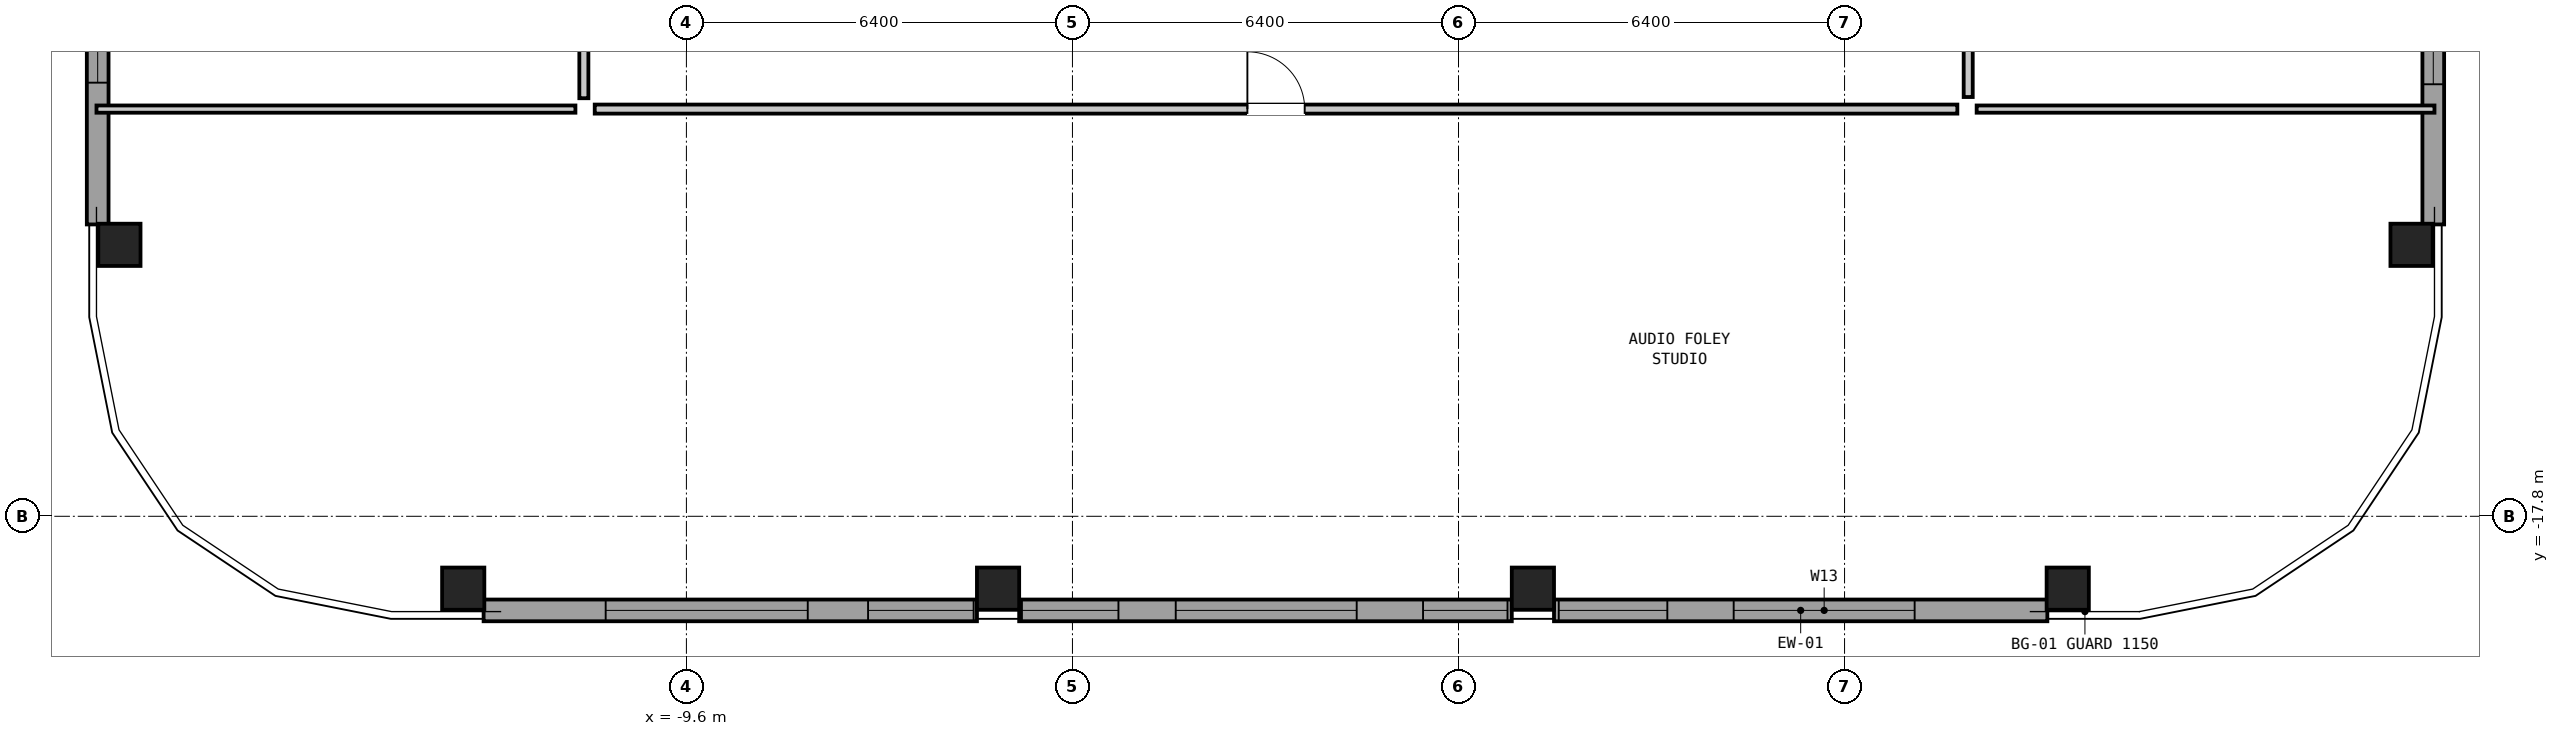
"""IFC4 building model, lengths in metres.
Left out: names, types, materials, properties, quantities, classifications, styles, units other than length and angle.
Written with IfcOpenShell. Run it as: python <this file> out.ifc"""

import sys

from ifc_helpers import new_model, si_unit, direction, frame, frame_2d, origin, origin_2d, place, context, subcontext, project, spatial, rectangle, hollow_rectangle, extrude, element, fill, save


model = new_model("IFC4")
c1 = context("Model", 3, precision=1e-05, world=origin(), true_north=direction((0.0, 1.0)))
c2 = subcontext(c1, "Body", "Model", "MODEL_VIEW")
j1 = project(units=[si_unit("LENGTHUNIT", "METRE"), si_unit("PLANEANGLEUNIT", "RADIAN")], contexts=[c1])
p1 = place(None, origin())
s1 = spatial("IfcSite", under=j1, at=p1, CompositionType="ELEMENT")
p2 = place(p1, origin())
s2 = spatial("IfcBuilding", under=s1, at=p2, CompositionType="ELEMENT")
p3 = place(p2, frame((0.0, 0.0, 202.55)))
s3 = spatial("IfcBuildingStorey", under=s2, at=p3, CompositionType="ELEMENT", Elevation=202.55)
for number, where, z_axis, x_axis in (
    (1, (-13.3, -19.0, 0.0), (0.0, 0.0, 1.0), (1.0, 0.0, 0.0)),
    (2, (-4.433, -19.0, 0.0), (0.0, 0.0, 1.0), (1.0, 0.0, 0.0)),
    (3, (4.433, -19.0, 0.0), (0.0, 0.0, 1.0), (1.0, 0.0, 0.0)),
    (4, (13.3, -19.0, 0.0), (0.0, 0.0, 1.0), (1.0, 0.0, 0.0)),
    (5, (19.0, -13.3, 0.0), (0.0, 0.0, 1.0), (0.0, 1.0, 0.0)),
    (6, (-19.0, -13.3, 0.0), (0.0, 0.0, 1.0), (0.0, 1.0, 0.0)),
):
    element("IfcColumn", number, at=place(p3, frame(where, z_axis=z_axis, x_axis=x_axis)), inside=s3, PredefinedType="COLUMN", context=c2, shape_type="SweptSolid", body=[
        extrude(hollow_rectangle(XDim=0.7, YDim=0.7, WallThickness=0.045, at=origin_2d()), origin(), (0.0, 0.0, 1.0), 3.05),
    ])
p4 = place(p3, frame((12.962, -19.36, 0.0), z_axis=(0.0, 0.0, 1.0), x_axis=(-1.0, 0.0, 0.0)))
e7 = element("IfcWall", 7, at=p4, inside=s3, PredefinedType="SOLIDWALL", context=c2, shape_type="SweptSolid", body=[
    extrude(rectangle(XDim=8.179, YDim=0.36, at=frame_2d((4.089, 0.0))), origin(), (0.0, 0.0, 1.0), 2.374),
])
p5 = place(p4, frame((2.2, 0.0, 0.2)))
e8 = element("IfcOpeningElement", 8, at=p5, cuts=e7, PredefinedType="OPENING", context=c2, shape_type="SweptSolid", body=[
    extrude(rectangle(XDim=3.0, YDim=1.0, at=frame_2d((1.5, 0.5))), frame((0.0, 0.192, 0.0), z_axis=(0.0, -1.0, 0.0), x_axis=(1.0, 0.0, 0.0)), (0.0, 0.0, 1.0), 0.384),
])
p6 = place(p4, frame((6.3, 0.0, 1.25)))
e9 = element("IfcOpeningElement", 9, at=p6, cuts=e7, PredefinedType="OPENING", context=c2, shape_type="SweptSolid", body=[
    extrude(rectangle(XDim=1.8, YDim=0.95, at=frame_2d((0.9, 0.475))), frame((0.0, 0.192, 0.0), z_axis=(0.0, -1.0, 0.0), x_axis=(1.0, 0.0, 0.0)), (0.0, 0.0, 1.0), 0.384),
])
p7 = place(p3, frame((4.083, -19.36, 0.0), z_axis=(0.0, 0.0, 1.0), x_axis=(-1.0, 0.0, 0.0)))
e10 = element("IfcWall", 10, at=p7, inside=s3, PredefinedType="SOLIDWALL", context=c2, shape_type="SweptSolid", body=[
    extrude(rectangle(XDim=8.167, YDim=0.36, at=frame_2d((4.083, 0.0))), origin(), (0.0, 0.0, 1.0), 2.374),
])
p8 = place(p7, frame((0.071, 0.0, 1.25)))
e11 = element("IfcOpeningElement", 11, at=p8, cuts=e10, PredefinedType="OPENING", context=c2, shape_type="SweptSolid", body=[
    extrude(rectangle(XDim=1.4, YDim=0.95, at=frame_2d((0.7, 0.475))), frame((0.0, 0.192, 0.0), z_axis=(0.0, -1.0, 0.0), x_axis=(1.0, 0.0, 0.0)), (0.0, 0.0, 1.0), 0.384),
])
p9 = place(p7, frame((2.571, 0.0, 0.2)))
e12 = element("IfcOpeningElement", 12, at=p9, cuts=e10, PredefinedType="OPENING", context=c2, shape_type="SweptSolid", body=[
    extrude(rectangle(XDim=3.0, YDim=1.0, at=frame_2d((1.5, 0.5))), frame((0.0, 0.192, 0.0), z_axis=(0.0, -1.0, 0.0), x_axis=(1.0, 0.0, 0.0)), (0.0, 0.0, 1.0), 0.384),
])
p10 = place(p7, frame((6.521, 0.0, 1.35)))
e13 = element("IfcOpeningElement", 13, at=p10, cuts=e10, PredefinedType="OPENING", context=c2, shape_type="SweptSolid", body=[
    extrude(rectangle(XDim=1.6, YDim=0.85, at=frame_2d((0.8, 0.425))), frame((0.0, 0.192, 0.0), z_axis=(0.0, -1.0, 0.0), x_axis=(1.0, 0.0, 0.0)), (0.0, 0.0, 1.0), 0.384),
])
p11 = place(p3, frame((-4.783, -19.36, 0.0), z_axis=(0.0, 0.0, 1.0), x_axis=(-1.0, 0.0, 0.0)))
e14 = element("IfcWall", 14, at=p11, inside=s3, PredefinedType="SOLIDWALL", context=c2, shape_type="SweptSolid", body=[
    extrude(rectangle(XDim=8.179, YDim=0.36, at=frame_2d((4.089, 0.0))), origin(), (0.0, 0.0, 1.0), 2.374),
])
p12 = place(p11, frame((0.055, 0.0, 1.2)))
e15 = element("IfcOpeningElement", 15, at=p12, cuts=e14, PredefinedType="OPENING", context=c2, shape_type="SweptSolid", body=[
    extrude(rectangle(XDim=1.75, YDim=1.0, at=frame_2d((0.875, 0.5))), frame((0.0, 0.192, 0.0), z_axis=(0.0, -1.0, 0.0), x_axis=(1.0, 0.0, 0.0)), (0.0, 0.0, 1.0), 0.384),
])
p13 = place(p11, frame((2.805, 0.0, 0.2)))
e16 = element("IfcOpeningElement", 16, at=p13, cuts=e14, PredefinedType="OPENING", context=c2, shape_type="SweptSolid", body=[
    extrude(rectangle(XDim=3.35, YDim=0.9, at=frame_2d((1.675, 0.45))), frame((0.0, 0.192, 0.0), z_axis=(0.0, -1.0, 0.0), x_axis=(1.0, 0.0, 0.0)), (0.0, 0.0, 1.0), 0.384),
])
p14 = place(p3, frame((19.36, -4.783, 0.0), z_axis=(0.0, 0.0, 1.0), x_axis=(0.0, -1.0, 0.0)))
e17 = element("IfcWall", 17, at=p14, inside=s3, PredefinedType="SOLIDWALL", context=c2, shape_type="SweptSolid", body=[
    extrude(rectangle(XDim=8.179, YDim=0.36, at=frame_2d((4.089, 0.0))), origin(), (0.0, 0.0, 1.0), 2.374),
])
p15 = place(p14, frame((0.055, 0.0, 1.1)))
e18 = element("IfcOpeningElement", 18, at=p15, cuts=e17, PredefinedType="OPENING", context=c2, shape_type="SweptSolid", body=[
    extrude(rectangle(XDim=1.75, YDim=1.1, at=frame_2d((0.875, 0.55))), frame((0.0, 0.192, 0.0), z_axis=(0.0, -1.0, 0.0), x_axis=(1.0, 0.0, 0.0)), (0.0, 0.0, 1.0), 0.384),
])
p16 = place(p14, frame((3.055, 0.0, 0.2)))
e19 = element("IfcOpeningElement", 19, at=p16, cuts=e17, PredefinedType="OPENING", context=c2, shape_type="SweptSolid", body=[
    extrude(rectangle(XDim=2.8, YDim=1.15, at=frame_2d((1.4, 0.575))), frame((0.0, 0.192, 0.0), z_axis=(0.0, -1.0, 0.0), x_axis=(1.0, 0.0, 0.0)), (0.0, 0.0, 1.0), 0.384),
])
p17 = place(p3, frame((-19.36, -12.962, 0.0), z_axis=(0.0, 0.0, 1.0), x_axis=(0.0, 1.0, 0.0)))
e20 = element("IfcWall", 20, at=p17, inside=s3, PredefinedType="SOLIDWALL", context=c2, shape_type="SweptSolid", body=[
    extrude(rectangle(XDim=8.179, YDim=0.36, at=frame_2d((4.089, 0.0))), origin(), (0.0, 0.0, 1.0), 2.374),
])
p18 = place(p17, frame((2.35, 0.0, 0.2)))
e21 = element("IfcOpeningElement", 21, at=p18, cuts=e20, PredefinedType="OPENING", context=c2, shape_type="SweptSolid", body=[
    extrude(rectangle(XDim=2.7, YDim=1.2, at=frame_2d((1.35, 0.6))), frame((0.0, 0.192, 0.0), z_axis=(0.0, -1.0, 0.0), x_axis=(1.0, 0.0, 0.0)), (0.0, 0.0, 1.0), 0.384),
])
p19 = place(p17, frame((6.3, 0.0, 1.15)))
e22 = element("IfcOpeningElement", 22, at=p19, cuts=e20, PredefinedType="OPENING", context=c2, shape_type="SweptSolid", body=[
    extrude(rectangle(XDim=1.8, YDim=1.05, at=frame_2d((0.9, 0.525))), frame((0.0, 0.192, 0.0), z_axis=(0.0, -1.0, 0.0), x_axis=(1.0, 0.0, 0.0)), (0.0, 0.0, 1.0), 0.384),
])
p20 = place(p3, frame((-19.38, -11.05, 0.0), z_axis=(0.0, 0.0, 1.0), x_axis=(1.0, 0.0, 0.0)))
e23 = element("IfcWall", 23, at=p20, inside=s3, PredefinedType="PARTITIONING", context=c2, shape_type="SweptSolid", body=[
    extrude(rectangle(XDim=7.94, YDim=0.12, at=frame_2d((3.97, 0.0))), origin(), (0.0, 0.0, 1.0), 2.86),
])
p21 = place(p3, frame((11.79, -11.05, 0.0), z_axis=(0.0, 0.0, 1.0), x_axis=(1.0, 0.0, 0.0)))
e24 = element("IfcWall", 24, at=p21, inside=s3, PredefinedType="PARTITIONING", context=c2, shape_type="SweptSolid", body=[
    extrude(rectangle(XDim=7.59, YDim=0.12, at=frame_2d((3.795, 0.0))), origin(), (0.0, 0.0, 1.0), 2.86),
])
p22 = place(p3, frame((-11.12, -11.05, 0.0), z_axis=(0.0, 0.0, 1.0), x_axis=(1.0, 0.0, 0.0)))
e25 = element("IfcWall", 25, at=p22, inside=s3, PredefinedType="PARTITIONING", context=c2, shape_type="SweptSolid", body=[
    extrude(rectangle(XDim=22.59, YDim=0.15, at=frame_2d((11.295, 0.0))), origin(), (0.0, 0.0, 1.0), 2.86),
])
p23 = place(p22, frame((10.82, 0.0, 0.0)))
e26 = element("IfcOpeningElement", 26, at=p23, cuts=e25, PredefinedType="OPENING", context=c2, shape_type="SweptSolid", body=[
    extrude(rectangle(XDim=0.95, YDim=2.1, at=frame_2d((0.475, 1.05))), frame((0.0, 0.087, 0.0), z_axis=(0.0, -1.0, 0.0), x_axis=(1.0, 0.0, 0.0)), (0.0, 0.0, 1.0), 0.174),
])
p24 = place(p3, frame((-11.3, -10.87, 0.0), z_axis=(0.0, 0.0, 1.0), x_axis=(0.0, 1.0, 0.0)))
e27 = element("IfcWall", 27, at=p24, inside=s3, PredefinedType="PARTITIONING", context=c2, shape_type="SweptSolid", body=[
    extrude(rectangle(XDim=22.94, YDim=0.15, at=frame_2d((11.47, 0.0))), origin(), (0.0, 0.0, 1.0), 2.86),
])
p25 = place(p24, frame((10.995, 0.0, 0.0)))
e28 = element("IfcOpeningElement", 28, at=p25, cuts=e27, PredefinedType="OPENING", context=c2, shape_type="SweptSolid", body=[
    extrude(rectangle(XDim=0.95, YDim=2.1, at=frame_2d((0.475, 1.05))), frame((0.0, 0.087, 0.0), z_axis=(0.0, -1.0, 0.0), x_axis=(1.0, 0.0, 0.0)), (0.0, 0.0, 1.0), 0.174),
])
p26 = place(p3, frame((11.65, -10.85, 0.0), z_axis=(0.0, 0.0, 1.0), x_axis=(0.0, 1.0, 0.0)))
e29 = element("IfcWall", 29, at=p26, inside=s3, PredefinedType="PARTITIONING", context=c2, shape_type="SweptSolid", body=[
    extrude(rectangle(XDim=8.29, YDim=0.15, at=frame_2d((4.145, 0.0))), origin(), (0.0, 0.0, 1.0), 2.86),
])
p27 = place(p26, frame((3.67, 0.0, 0.0)))
e30 = element("IfcOpeningElement", 30, at=p27, cuts=e29, PredefinedType="OPENING", context=c2, shape_type="SweptSolid", body=[
    extrude(rectangle(XDim=0.95, YDim=2.1, at=frame_2d((0.475, 1.05))), frame((0.0, 0.087, 0.0), z_axis=(0.0, -1.0, 0.0), x_axis=(1.0, 0.0, 0.0)), (0.0, 0.0, 1.0), 0.174),
])
p28 = place(p5, origin())
e31 = element("IfcWindow", 31, at=p28, inside=s3, PartitioningType="SINGLE_PANEL", PredefinedType="WINDOW", context=c2, shape_type="SweptSolid", body=[
    extrude(rectangle(XDim=3.0, YDim=1.0, at=frame_2d((1.5, 0.5))), frame((0.0, 0.03, 0.0), z_axis=(0.0, -1.0, 0.0), x_axis=(1.0, 0.0, 0.0)), (0.0, 0.0, 1.0), 0.06),
])
fill(e8, e31)
p29 = place(p6, origin())
e32 = element("IfcWindow", 32, at=p29, inside=s3, PartitioningType="SINGLE_PANEL", PredefinedType="WINDOW", context=c2, shape_type="SweptSolid", body=[
    extrude(rectangle(XDim=1.8, YDim=0.95, at=frame_2d((0.9, 0.475))), frame((0.0, 0.03, 0.0), z_axis=(0.0, -1.0, 0.0), x_axis=(1.0, 0.0, 0.0)), (0.0, 0.0, 1.0), 0.06),
])
fill(e9, e32)
p30 = place(p8, origin())
e33 = element("IfcWindow", 33, at=p30, inside=s3, PartitioningType="SINGLE_PANEL", PredefinedType="WINDOW", context=c2, shape_type="SweptSolid", body=[
    extrude(rectangle(XDim=1.4, YDim=0.95, at=frame_2d((0.7, 0.475))), frame((0.0, 0.03, 0.0), z_axis=(0.0, -1.0, 0.0), x_axis=(1.0, 0.0, 0.0)), (0.0, 0.0, 1.0), 0.06),
])
fill(e11, e33)
p31 = place(p9, origin())
e34 = element("IfcWindow", 34, at=p31, inside=s3, PartitioningType="SINGLE_PANEL", PredefinedType="WINDOW", context=c2, shape_type="SweptSolid", body=[
    extrude(rectangle(XDim=3.0, YDim=1.0, at=frame_2d((1.5, 0.5))), frame((0.0, 0.03, 0.0), z_axis=(0.0, -1.0, 0.0), x_axis=(1.0, 0.0, 0.0)), (0.0, 0.0, 1.0), 0.06),
])
fill(e12, e34)
p32 = place(p10, origin())
e35 = element("IfcWindow", 35, at=p32, inside=s3, PartitioningType="SINGLE_PANEL", PredefinedType="WINDOW", context=c2, shape_type="SweptSolid", body=[
    extrude(rectangle(XDim=1.6, YDim=0.85, at=frame_2d((0.8, 0.425))), frame((0.0, 0.03, 0.0), z_axis=(0.0, -1.0, 0.0), x_axis=(1.0, 0.0, 0.0)), (0.0, 0.0, 1.0), 0.06),
])
fill(e13, e35)
p33 = place(p12, origin())
e36 = element("IfcWindow", 36, at=p33, inside=s3, PartitioningType="SINGLE_PANEL", PredefinedType="WINDOW", context=c2, shape_type="SweptSolid", body=[
    extrude(rectangle(XDim=1.75, YDim=1.0, at=frame_2d((0.875, 0.5))), frame((0.0, 0.03, 0.0), z_axis=(0.0, -1.0, 0.0), x_axis=(1.0, 0.0, 0.0)), (0.0, 0.0, 1.0), 0.06),
])
fill(e15, e36)
p34 = place(p13, origin())
e37 = element("IfcWindow", 37, at=p34, inside=s3, PartitioningType="SINGLE_PANEL", PredefinedType="WINDOW", context=c2, shape_type="SweptSolid", body=[
    extrude(rectangle(XDim=3.35, YDim=0.9, at=frame_2d((1.675, 0.45))), frame((0.0, 0.03, 0.0), z_axis=(0.0, -1.0, 0.0), x_axis=(1.0, 0.0, 0.0)), (0.0, 0.0, 1.0), 0.06),
])
fill(e16, e37)
p35 = place(p16, origin())
e38 = element("IfcWindow", 38, at=p35, inside=s3, PartitioningType="SINGLE_PANEL", PredefinedType="WINDOW", context=c2, shape_type="SweptSolid", body=[
    extrude(rectangle(XDim=2.8, YDim=1.15, at=frame_2d((1.4, 0.575))), frame((0.0, 0.03, 0.0), z_axis=(0.0, -1.0, 0.0), x_axis=(1.0, 0.0, 0.0)), (0.0, 0.0, 1.0), 0.06),
])
fill(e19, e38)
p36 = place(p18, origin())
e39 = element("IfcWindow", 39, at=p36, inside=s3, PartitioningType="SINGLE_PANEL", PredefinedType="WINDOW", context=c2, shape_type="SweptSolid", body=[
    extrude(rectangle(XDim=2.7, YDim=1.2, at=frame_2d((1.35, 0.6))), frame((0.0, 0.03, 0.0), z_axis=(0.0, -1.0, 0.0), x_axis=(1.0, 0.0, 0.0)), (0.0, 0.0, 1.0), 0.06),
])
fill(e21, e39)
p37 = place(p23, origin())
e40 = element("IfcDoor", 40, at=p37, inside=s3, OperationType="SINGLE_SWING_LEFT", PredefinedType="DOOR", context=c2, shape_type="SweptSolid", body=[
    extrude(rectangle(XDim=0.95, YDim=2.1, at=frame_2d((0.475, 1.05))), frame((0.0, 0.025, 0.0), z_axis=(0.0, -1.0, 0.0), x_axis=(1.0, 0.0, 0.0)), (0.0, 0.0, 1.0), 0.05),
])
fill(e26, e40)
save(model, sys.argv[1])
